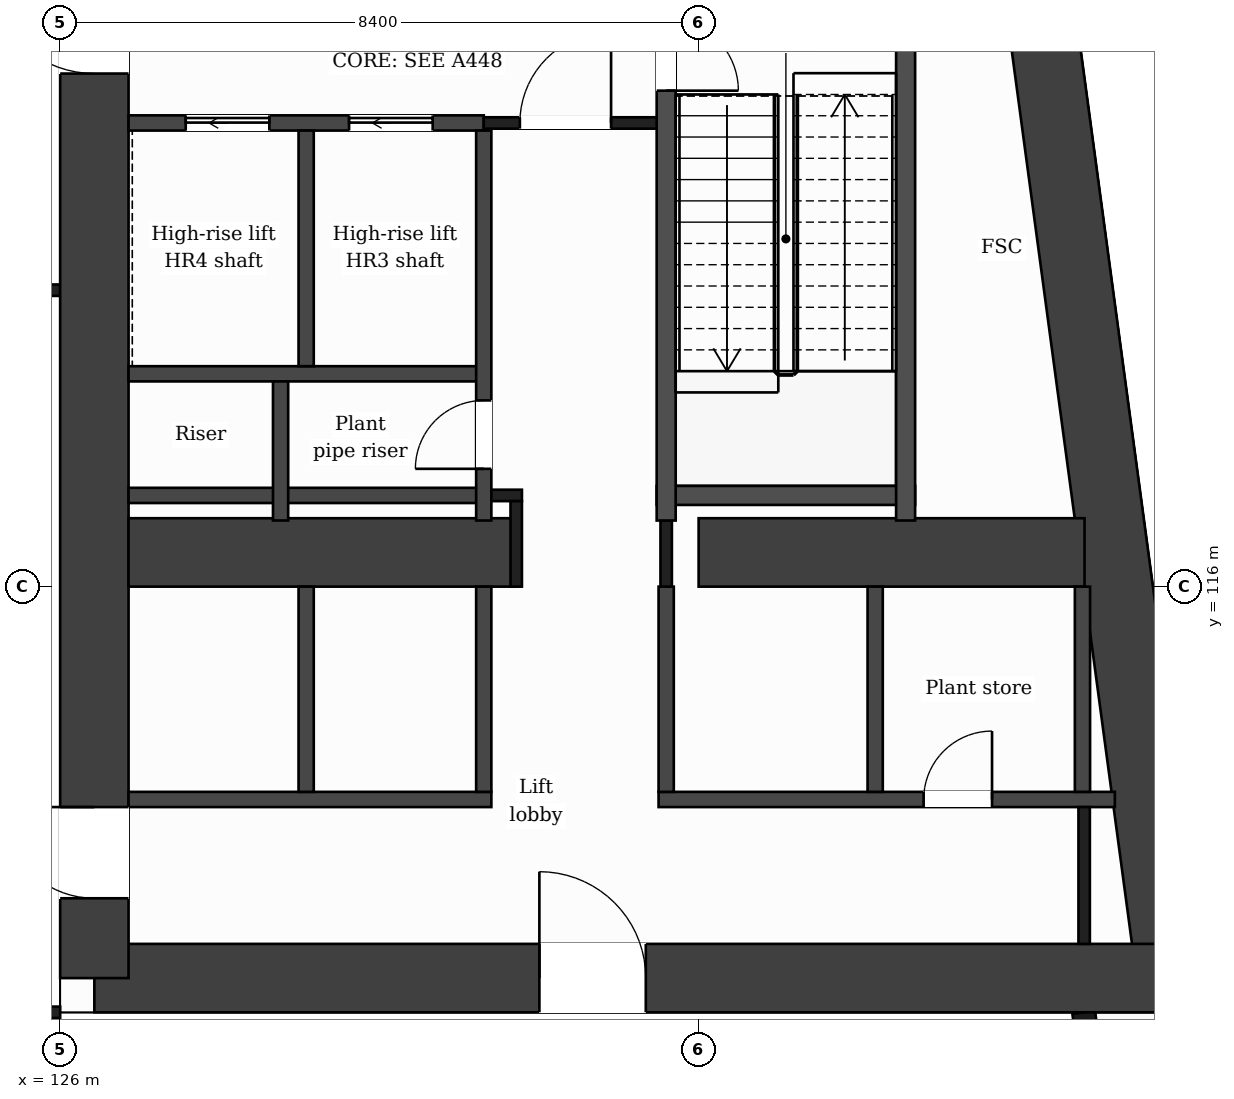
"""IFC4 building model, lengths in metres.
Left out: names, types, materials, properties, quantities, classifications, styles, units other than length and angle.
Written with IfcOpenShell. Run it as: python <this file> out.ifc"""

import sys

from ifc_helpers import new_model, si_unit, direction, frame, frame_2d, origin, place, context, subcontext, project, spatial, rectangle, extrude, element, fill, save


model = new_model("IFC4")
c1 = context("Model", 3, precision=1e-05, world=origin(), true_north=direction((0.0, 1.0)))
c2 = subcontext(c1, "Body", "Model", "MODEL_VIEW")
j1 = project(units=[si_unit("LENGTHUNIT", "METRE"), si_unit("PLANEANGLEUNIT", "RADIAN")], contexts=[c1])
p1 = place(None, origin())
s1 = spatial("IfcSite", under=j1, at=p1, CompositionType="ELEMENT")
p2 = place(p1, origin())
s2 = spatial("IfcBuilding", under=s1, at=p2, CompositionType="ELEMENT")
p3 = place(p2, frame((0.0, 0.0, 197.2)))
s3 = spatial("IfcBuildingStorey", under=s2, at=p3, CompositionType="ELEMENT", Elevation=197.2)
p4 = place(p3, frame((137.776, 131.95, 0.0), z_axis=(0.0, 0.0, 1.0), x_axis=(0.133421759112, -0.991059349482, 0.0)))
e1 = element("IfcWall", 1, at=p4, inside=s3, PredefinedType="SHEAR", context=c2, shape_type="SweptSolid", body=[
    extrude(rectangle(XDim=21.29, YDim=0.9, at=frame_2d((10.645, 0.0))), origin(), (0.0, 0.0, 1.0), 5.0),
])
p5 = place(p3, frame((140.616, 110.85, 0.0), z_axis=(0.0, 0.0, 1.0), x_axis=(-1.0, 0.0, 0.0)))
e2 = element("IfcWall", 2, at=p5, inside=s3, PredefinedType="SHEAR", context=c2, shape_type="SweptSolid", body=[
    extrude(rectangle(XDim=14.166, YDim=0.9, at=frame_2d((7.083, 0.0))), origin(), (0.0, 0.0, 1.0), 5.0),
])
p6 = place(p5, frame((6.911, 0.0, 0.0)))
e3 = element("IfcOpeningElement", 3, at=p6, cuts=e2, PredefinedType="OPENING", context=c2, shape_type="SweptSolid", body=[
    extrude(rectangle(XDim=1.4, YDim=2.1, at=frame_2d((0.7, 1.05))), frame((0.0, 0.46, 0.0), z_axis=(0.0, -1.0, 0.0), x_axis=(1.0, 0.0, 0.0)), (0.0, 0.0, 1.0), 0.92),
])
p7 = place(p3, frame((126.45, 110.85, 0.0), z_axis=(0.0, 0.0, 1.0), x_axis=(0.0, 1.0, 0.0)))
e4 = element("IfcWall", 4, at=p7, inside=s3, PredefinedType="SHEAR", context=c2, shape_type="SweptSolid", body=[
    extrude(rectangle(XDim=21.1, YDim=0.9, at=frame_2d((10.55, 0.0))), origin(), (0.0, 0.0, 1.0), 5.0),
])
p8 = place(p7, frame((1.05, 0.0, 0.0)))
e5 = element("IfcOpeningElement", 5, at=p8, cuts=e4, PredefinedType="OPENING", context=c2, shape_type="SweptSolid", body=[
    extrude(rectangle(XDim=1.2, YDim=2.1, at=frame_2d((0.6, 1.05))), frame((0.0, 0.46, 0.0), z_axis=(0.0, -1.0, 0.0), x_axis=(1.0, 0.0, 0.0)), (0.0, 0.0, 1.0), 0.92),
])
p9 = place(p7, frame((11.9, 0.0, 0.0)))
e6 = element("IfcOpeningElement", 6, at=p9, cuts=e4, PredefinedType="OPENING", context=c2, shape_type="SweptSolid", body=[
    extrude(rectangle(XDim=1.4, YDim=2.1, at=frame_2d((0.7, 1.05))), frame((0.0, 0.46, 0.0), z_axis=(0.0, -1.0, 0.0), x_axis=(1.0, 0.0, 0.0)), (0.0, 0.0, 1.0), 0.92),
])
p10 = place(p3, frame((126.9, 116.45, 0.0), z_axis=(0.0, 0.0, 1.0), x_axis=(1.0, 0.0, 0.0)))
e7 = element("IfcWall", 7, at=p10, inside=s3, PredefinedType="SHEAR", context=c2, shape_type="SweptSolid", body=[
    extrude(rectangle(XDim=5.1, YDim=0.9, at=frame_2d((2.55, 0.0))), origin(), (0.0, 0.0, 1.0), 5.0),
])
p11 = place(p3, frame((134.4, 116.45, 0.0), z_axis=(0.0, 0.0, 1.0), x_axis=(1.0, 0.0, 0.0)))
e8 = element("IfcWall", 8, at=p11, inside=s3, PredefinedType="SHEAR", context=c2, shape_type="SweptSolid", body=[
    extrude(rectangle(XDim=5.077, YDim=0.9, at=frame_2d((2.539, 0.0))), origin(), (0.0, 0.0, 1.0), 5.0),
])
p12 = place(p3, frame((140.348, 103.85, 0.0), z_axis=(0.0, 0.0, 1.0), x_axis=(-0.133431549479, 0.991058031401, 0.0)))
e9 = element("IfcWall", 9, at=p12, inside=s3, PredefinedType="SOLIDWALL", context=c2, shape_type="SweptSolid", body=[
    extrude(rectangle(XDim=6.609, YDim=0.3, at=frame_2d((3.304, 0.0))), origin(), (0.0, 0.0, 1.0), 4.68),
])
p13 = place(p12, frame((3.991, 0.0, 0.0)))
e10 = element("IfcOpeningElement", 10, at=p13, cuts=e9, PredefinedType="OPENING", context=c2, shape_type="SweptSolid", body=[
    extrude(rectangle(XDim=1.2, YDim=2.4, at=frame_2d((0.6, 1.2))), frame((0.0, 0.16, 0.0), z_axis=(0.0, -1.0, 0.0), x_axis=(1.0, 0.0, 0.0)), (0.0, 0.0, 1.0), 0.32),
])
p14 = place(p3, frame((100.8, 110.4, 0.0), z_axis=(0.0, 0.0, 1.0), x_axis=(1.0, 0.0, 0.0)))
e11 = element("IfcWall", 11, at=p14, inside=s3, PredefinedType="PARTITIONING", context=c2, shape_type="SweptSolid", body=[
    extrude(rectangle(XDim=25.2, YDim=0.15, at=frame_2d((12.6, 0.0))), origin(), (0.0, 0.0, 1.0), 4.68),
])
p15 = place(p3, frame((126.9, 113.2, 0.0), z_axis=(0.0, 0.0, 1.0), x_axis=(1.0, 0.0, 0.0)))
e12 = element("IfcWall", 12, at=p15, inside=s3, PredefinedType="PARTITIONING", context=c2, shape_type="SweptSolid", body=[
    extrude(rectangle(XDim=4.773, YDim=0.2, at=frame_2d((2.387, 0.0))), origin(), (0.0, 0.0, 1.0), 4.68),
])
p16 = place(p3, frame((133.873, 113.2, 0.0), z_axis=(0.0, 0.0, 1.0), x_axis=(1.0, 0.0, 0.0)))
e13 = element("IfcWall", 13, at=p16, inside=s3, PredefinedType="PARTITIONING", context=c2, shape_type="SweptSolid", body=[
    extrude(rectangle(XDim=6.003, YDim=0.2, at=frame_2d((3.001, 0.0))), origin(), (0.0, 0.0, 1.0), 4.68),
])
p17 = place(p16, frame((3.487, 0.0, 0.0)))
e14 = element("IfcOpeningElement", 14, at=p17, cuts=e13, PredefinedType="OPENING", context=c2, shape_type="SweptSolid", body=[
    extrude(rectangle(XDim=0.9, YDim=2.1, at=frame_2d((0.45, 1.05))), frame((0.0, 0.11, 0.0), z_axis=(0.0, -1.0, 0.0), x_axis=(1.0, 0.0, 0.0)), (0.0, 0.0, 1.0), 0.22),
])
p18 = place(p3, frame((126.9, 117.2, 0.0), z_axis=(0.0, 0.0, 1.0), x_axis=(1.0, 0.0, 0.0)))
e15 = element("IfcWall", 15, at=p18, inside=s3, PredefinedType="PARTITIONING", context=c2, shape_type="SweptSolid", body=[
    extrude(rectangle(XDim=4.673, YDim=0.2, at=frame_2d((2.336, 0.0))), origin(), (0.0, 0.0, 1.0), 4.68),
])
p19 = place(p3, frame((131.573, 117.2, 0.0), z_axis=(0.0, 0.0, 1.0), x_axis=(1.0, 0.0, 0.0)))
e16 = element("IfcWall", 16, at=p19, inside=s3, PredefinedType="PARTITIONING", context=c2, shape_type="SweptSolid", body=[
    extrude(rectangle(XDim=0.502, YDim=0.15, at=frame_2d((0.251, 0.0))), origin(), (0.0, 0.0, 1.0), 4.68),
])
p20 = place(p3, frame((133.848, 117.2, 0.0), z_axis=(0.0, 0.0, 1.0), x_axis=(1.0, 0.0, 0.0)))
e17 = element("IfcWall", 17, at=p20, inside=s3, PredefinedType="PARTITIONING", context=c2, shape_type="SweptSolid", body=[
    extrude(rectangle(XDim=3.4, YDim=0.25, at=frame_2d((1.7, 0.0))), origin(), (0.0, 0.0, 1.0), 4.68),
])
p21 = place(p3, frame((126.9, 118.8, 0.0), z_axis=(0.0, 0.0, 1.0), x_axis=(1.0, 0.0, 0.0)))
e18 = element("IfcWall", 18, at=p21, inside=s3, PredefinedType="PARTITIONING", context=c2, shape_type="SweptSolid", body=[
    extrude(rectangle(XDim=4.673, YDim=0.2, at=frame_2d((2.336, 0.0))), origin(), (0.0, 0.0, 1.0), 4.68),
])
p22 = place(p3, frame((100.8, 119.9, 0.0), z_axis=(0.0, 0.0, 1.0), x_axis=(1.0, 0.0, 0.0)))
e19 = element("IfcWall", 19, at=p22, inside=s3, PredefinedType="PARTITIONING", context=c2, shape_type="SweptSolid", body=[
    extrude(rectangle(XDim=25.2, YDim=0.15, at=frame_2d((12.6, 0.0))), origin(), (0.0, 0.0, 1.0), 4.68),
])
p23 = place(p22, frame((3.6, 0.0, 0.0)))
e20 = element("IfcOpeningElement", 20, at=p23, cuts=e19, PredefinedType="OPENING", context=c2, shape_type="SweptSolid", body=[
    extrude(rectangle(XDim=1.2, YDim=2.1, at=frame_2d((0.6, 1.05))), frame((0.0, 0.085, 0.0), z_axis=(0.0, -1.0, 0.0), x_axis=(1.0, 0.0, 0.0)), (0.0, 0.0, 1.0), 0.17),
])
p24 = place(p22, frame((12.0, 0.0, 0.0)))
e21 = element("IfcOpeningElement", 21, at=p24, cuts=e19, PredefinedType="OPENING", context=c2, shape_type="SweptSolid", body=[
    extrude(rectangle(XDim=1.2, YDim=2.1, at=frame_2d((0.6, 1.05))), frame((0.0, 0.085, 0.0), z_axis=(0.0, -1.0, 0.0), x_axis=(1.0, 0.0, 0.0)), (0.0, 0.0, 1.0), 0.17),
])
p25 = place(p22, frame((20.4, 0.0, 0.0)))
e22 = element("IfcOpeningElement", 22, at=p25, cuts=e19, PredefinedType="OPENING", context=c2, shape_type="SweptSolid", body=[
    extrude(rectangle(XDim=1.2, YDim=2.1, at=frame_2d((0.6, 1.05))), frame((0.0, 0.085, 0.0), z_axis=(0.0, -1.0, 0.0), x_axis=(1.0, 0.0, 0.0)), (0.0, 0.0, 1.0), 0.17),
])
p26 = place(p3, frame((126.9, 122.1, 0.0), z_axis=(0.0, 0.0, 1.0), x_axis=(1.0, 0.0, 0.0)))
e23 = element("IfcWall", 23, at=p26, inside=s3, PredefinedType="PARTITIONING", context=c2, shape_type="SweptSolid", body=[
    extrude(rectangle(XDim=4.673, YDim=0.2, at=frame_2d((2.336, 0.0))), origin(), (0.0, 0.0, 1.0), 4.68),
])
p27 = place(p26, frame((2.901, 0.0, 0.0)))
e24 = element("IfcOpeningElement", 24, at=p27, cuts=e23, PredefinedType="OPENING", context=c2, shape_type="SweptSolid", body=[
    extrude(rectangle(XDim=1.1, YDim=2.1, at=frame_2d((0.55, 1.05))), frame((0.0, 0.11, 0.0), z_axis=(0.0, -1.0, 0.0), x_axis=(1.0, 0.0, 0.0)), (0.0, 0.0, 1.0), 0.22),
])
p28 = place(p26, frame((0.752, 0.0, 0.0)))
e25 = element("IfcOpeningElement", 25, at=p28, cuts=e23, PredefinedType="OPENING", context=c2, shape_type="SweptSolid", body=[
    extrude(rectangle(XDim=1.1, YDim=2.1, at=frame_2d((0.55, 1.05))), frame((0.0, 0.11, 0.0), z_axis=(0.0, -1.0, 0.0), x_axis=(1.0, 0.0, 0.0)), (0.0, 0.0, 1.0), 0.22),
])
p29 = place(p3, frame((131.573, 122.1, 0.0), z_axis=(0.0, 0.0, 1.0), x_axis=(1.0, 0.0, 0.0)))
e26 = element("IfcWall", 26, at=p29, inside=s3, PredefinedType="PARTITIONING", context=c2, shape_type="SweptSolid", body=[
    extrude(rectangle(XDim=2.4, YDim=0.15, at=frame_2d((1.2, 0.0))), origin(), (0.0, 0.0, 1.0), 4.68),
])
p30 = place(p29, frame((0.475, 0.0, 0.0)))
e27 = element("IfcOpeningElement", 27, at=p30, cuts=e26, PredefinedType="OPENING", context=c2, shape_type="SweptSolid", body=[
    extrude(rectangle(XDim=1.2, YDim=2.1, at=frame_2d((0.6, 1.05))), frame((0.0, 0.085, 0.0), z_axis=(0.0, -1.0, 0.0), x_axis=(1.0, 0.0, 0.0)), (0.0, 0.0, 1.0), 0.17),
])
p31 = place(p3, frame((128.9, 116.87, 0.0), z_axis=(0.0, 0.0, 1.0), x_axis=(0.0, 1.0, 0.0)))
e28 = element("IfcWall", 28, at=p31, inside=s3, PredefinedType="PARTITIONING", context=c2, shape_type="SweptSolid", body=[
    extrude(rectangle(XDim=1.83, YDim=0.2, at=frame_2d((0.915, 0.0))), origin(), (0.0, 0.0, 1.0), 4.68),
])
p32 = place(p3, frame((129.237, 113.3, 0.0), z_axis=(0.0, 0.0, 1.0), x_axis=(0.0, 1.0, 0.0)))
e29 = element("IfcWall", 29, at=p32, inside=s3, PredefinedType="PARTITIONING", context=c2, shape_type="SweptSolid", body=[
    extrude(rectangle(XDim=2.7, YDim=0.2, at=frame_2d((1.35, 0.0))), origin(), (0.0, 0.0, 1.0), 4.68),
])
p33 = place(p3, frame((129.237, 118.9, 0.0), z_axis=(0.0, 0.0, 1.0), x_axis=(0.0, 1.0, 0.0)))
e30 = element("IfcWall", 30, at=p33, inside=s3, PredefinedType="PARTITIONING", context=c2, shape_type="SweptSolid", body=[
    extrude(rectangle(XDim=3.1, YDim=0.2, at=frame_2d((1.55, 0.0))), origin(), (0.0, 0.0, 1.0), 4.68),
])
p34 = place(p3, frame((131.573, 113.3, 0.0), z_axis=(0.0, 0.0, 1.0), x_axis=(0.0, 1.0, 0.0)))
e31 = element("IfcWall", 31, at=p34, inside=s3, PredefinedType="PARTITIONING", context=c2, shape_type="SweptSolid", body=[
    extrude(rectangle(XDim=2.7, YDim=0.2, at=frame_2d((1.35, 0.0))), origin(), (0.0, 0.0, 1.0), 4.68),
])
p35 = place(p3, frame((131.573, 116.87, 0.0), z_axis=(0.0, 0.0, 1.0), x_axis=(0.0, 1.0, 0.0)))
e32 = element("IfcWall", 32, at=p35, inside=s3, PredefinedType="PARTITIONING", context=c2, shape_type="SweptSolid", body=[
    extrude(rectangle(XDim=5.13, YDim=0.2, at=frame_2d((2.565, 0.0))), origin(), (0.0, 0.0, 1.0), 4.68),
])
p36 = place(p35, frame((0.68, 0.0, 0.0)))
e33 = element("IfcOpeningElement", 33, at=p36, cuts=e32, PredefinedType="OPENING", context=c2, shape_type="SweptSolid", body=[
    extrude(rectangle(XDim=0.9, YDim=2.1, at=frame_2d((0.45, 1.05))), frame((0.0, 0.11, 0.0), z_axis=(0.0, -1.0, 0.0), x_axis=(1.0, 0.0, 0.0)), (0.0, 0.0, 1.0), 0.22),
])
p37 = place(p3, frame((132.0, 116.0, 0.0), z_axis=(0.0, 0.0, 1.0), x_axis=(0.0, 1.0, 0.0)))
e34 = element("IfcWall", 34, at=p37, inside=s3, PredefinedType="PARTITIONING", context=c2, shape_type="SweptSolid", body=[
    extrude(rectangle(XDim=1.125, YDim=0.15, at=frame_2d((0.562, 0.0))), origin(), (0.0, 0.0, 1.0), 4.68),
])
p38 = place(p3, frame((133.973, 113.3, 0.0), z_axis=(0.0, 0.0, 1.0), x_axis=(0.0, 1.0, 0.0)))
e35 = element("IfcWall", 35, at=p38, inside=s3, PredefinedType="PARTITIONING", context=c2, shape_type="SweptSolid", body=[
    extrude(rectangle(XDim=2.7, YDim=0.2, at=frame_2d((1.35, 0.0))), origin(), (0.0, 0.0, 1.0), 4.68),
])
p39 = place(p3, frame((133.973, 116.0, 0.0), z_axis=(0.0, 0.0, 1.0), x_axis=(0.0, 1.0, 0.0)))
e36 = element("IfcWall", 36, at=p39, inside=s3, PredefinedType="PARTITIONING", context=c2, shape_type="SweptSolid", body=[
    extrude(rectangle(XDim=0.87, YDim=0.15, at=frame_2d((0.435, 0.0))), origin(), (0.0, 0.0, 1.0), 4.68),
])
p40 = place(p3, frame((133.973, 116.87, 0.0), z_axis=(0.0, 0.0, 1.0), x_axis=(0.0, 1.0, 0.0)))
e37 = element("IfcWall", 37, at=p40, inside=s3, PredefinedType="PARTITIONING", context=c2, shape_type="SweptSolid", body=[
    extrude(rectangle(XDim=6.955, YDim=0.25, at=frame_2d((3.478, 0.0))), origin(), (0.0, 0.0, 1.0), 4.68),
])
p41 = place(p40, frame((5.655, 0.0, 0.0)))
e38 = element("IfcOpeningElement", 38, at=p41, cuts=e37, PredefinedType="OPENING", context=c2, shape_type="SweptSolid", body=[
    extrude(rectangle(XDim=0.95, YDim=2.1, at=frame_2d((0.475, 1.05))), frame((0.0, 0.135, 0.0), z_axis=(0.0, -1.0, 0.0), x_axis=(1.0, 0.0, 0.0)), (0.0, 0.0, 1.0), 0.27),
])
p42 = place(p3, frame((136.722, 113.3, 0.0), z_axis=(0.0, 0.0, 1.0), x_axis=(0.0, 1.0, 0.0)))
e39 = element("IfcWall", 39, at=p42, inside=s3, PredefinedType="PARTITIONING", context=c2, shape_type="SweptSolid", body=[
    extrude(rectangle(XDim=2.7, YDim=0.2, at=frame_2d((1.35, 0.0))), origin(), (0.0, 0.0, 1.0), 4.68),
])
p43 = place(p3, frame((137.123, 116.87, 0.0), z_axis=(0.0, 0.0, 1.0), x_axis=(0.0, 1.0, 0.0)))
e40 = element("IfcWall", 40, at=p43, inside=s3, PredefinedType="PARTITIONING", context=c2, shape_type="SweptSolid", body=[
    extrude(rectangle(XDim=6.955, YDim=0.25, at=frame_2d((3.478, 0.0))), origin(), (0.0, 0.0, 1.0), 4.68),
])
p44 = place(p3, frame((139.45, 113.3, 0.0), z_axis=(0.0, 0.0, 1.0), x_axis=(0.0, 1.0, 0.0)))
e41 = element("IfcWall", 41, at=p44, inside=s3, PredefinedType="PARTITIONING", context=c2, shape_type="SweptSolid", body=[
    extrude(rectangle(XDim=2.7, YDim=0.2, at=frame_2d((1.35, 0.0))), origin(), (0.0, 0.0, 1.0), 4.68),
])
p45 = place(p3, frame((139.472, 111.3, 0.0), z_axis=(0.0, 0.0, 1.0), x_axis=(0.0, 1.0, 0.0)))
e42 = element("IfcWall", 42, at=p45, inside=s3, PredefinedType="PARTITIONING", context=c2, shape_type="SweptSolid", body=[
    extrude(rectangle(XDim=1.8, YDim=0.15, at=frame_2d((0.9, 0.0))), origin(), (0.0, 0.0, 1.0), 4.68),
])
p46 = place(p30, origin())
e43 = element("IfcDoor", 43, at=p46, inside=s3, OperationType="SINGLE_SWING_RIGHT", PredefinedType="DOOR", context=c2, shape_type="SweptSolid", body=[
    extrude(rectangle(XDim=1.2, YDim=2.1, at=frame_2d((0.6, 1.05))), frame((0.0, 0.025, 0.0), z_axis=(0.0, -1.0, 0.0), x_axis=(1.0, 0.0, 0.0)), (0.0, 0.0, 1.0), 0.05),
])
fill(e27, e43)
p47 = place(p27, origin())
e44 = element("IfcDoor", 44, at=p47, inside=s3, OperationType="SLIDING_TO_LEFT", PredefinedType="DOOR", context=c2, shape_type="SweptSolid", body=[
    extrude(rectangle(XDim=1.1, YDim=2.1, at=frame_2d((0.55, 1.05))), frame((0.0, 0.025, 0.0), z_axis=(0.0, -1.0, 0.0), x_axis=(1.0, 0.0, 0.0)), (0.0, 0.0, 1.0), 0.05),
])
fill(e24, e44)
p48 = place(p28, origin())
e45 = element("IfcDoor", 45, at=p48, inside=s3, OperationType="SLIDING_TO_LEFT", PredefinedType="DOOR", context=c2, shape_type="SweptSolid", body=[
    extrude(rectangle(XDim=1.1, YDim=2.1, at=frame_2d((0.55, 1.05))), frame((0.0, 0.025, 0.0), z_axis=(0.0, -1.0, 0.0), x_axis=(1.0, 0.0, 0.0)), (0.0, 0.0, 1.0), 0.05),
])
fill(e25, e45)
p49 = place(p41, origin())
e46 = element("IfcDoor", 46, at=p49, inside=s3, OperationType="SINGLE_SWING_LEFT", PredefinedType="DOOR", context=c2, shape_type="SweptSolid", body=[
    extrude(rectangle(XDim=0.95, YDim=2.1, at=frame_2d((0.475, 1.05))), frame((0.0, 0.025, 0.0), z_axis=(0.0, -1.0, 0.0), x_axis=(1.0, 0.0, 0.0)), (0.0, 0.0, 1.0), 0.05),
])
fill(e38, e46)
p50 = place(p36, origin())
e47 = element("IfcDoor", 47, at=p50, inside=s3, OperationType="SINGLE_SWING_LEFT", PredefinedType="DOOR", context=c2, shape_type="SweptSolid", body=[
    extrude(rectangle(XDim=0.9, YDim=2.1, at=frame_2d((0.45, 1.05))), frame((0.0, 0.025, 0.0), z_axis=(0.0, -1.0, 0.0), x_axis=(1.0, 0.0, 0.0)), (0.0, 0.0, 1.0), 0.05),
])
fill(e33, e47)
p51 = place(p17, origin())
e48 = element("IfcDoor", 48, at=p51, inside=s3, OperationType="SINGLE_SWING_RIGHT", PredefinedType="DOOR", context=c2, shape_type="SweptSolid", body=[
    extrude(rectangle(XDim=0.9, YDim=2.1, at=frame_2d((0.45, 1.05))), frame((0.0, 0.025, 0.0), z_axis=(0.0, -1.0, 0.0), x_axis=(1.0, 0.0, 0.0)), (0.0, 0.0, 1.0), 0.05),
])
fill(e14, e48)
p52 = place(p8, origin())
e49 = element("IfcDoor", 49, at=p52, inside=s3, OperationType="SINGLE_SWING_RIGHT", PredefinedType="DOOR", context=c2, shape_type="SweptSolid", body=[
    extrude(rectangle(XDim=1.2, YDim=2.1, at=frame_2d((0.6, 1.05))), frame((0.0, 0.025, 0.0), z_axis=(0.0, -1.0, 0.0), x_axis=(1.0, 0.0, 0.0)), (0.0, 0.0, 1.0), 0.05),
])
fill(e5, e49)
p53 = place(p6, origin())
e50 = element("IfcDoor", 50, at=p53, inside=s3, OperationType="SINGLE_SWING_RIGHT", PredefinedType="DOOR", context=c2, shape_type="SweptSolid", body=[
    extrude(rectangle(XDim=1.4, YDim=2.1, at=frame_2d((0.7, 1.05))), frame((0.0, 0.025, 0.0), z_axis=(0.0, -1.0, 0.0), x_axis=(1.0, 0.0, 0.0)), (0.0, 0.0, 1.0), 0.05),
])
fill(e3, e50)
p54 = place(p9, origin())
e51 = element("IfcDoor", 51, at=p54, inside=s3, OperationType="SINGLE_SWING_RIGHT", PredefinedType="DOOR", context=c2, shape_type="SweptSolid", body=[
    extrude(rectangle(XDim=1.4, YDim=2.1, at=frame_2d((0.7, 1.05))), frame((0.0, 0.025, 0.0), z_axis=(0.0, -1.0, 0.0), x_axis=(1.0, 0.0, 0.0)), (0.0, 0.0, 1.0), 0.05),
])
fill(e6, e51)
save(model, sys.argv[1])
